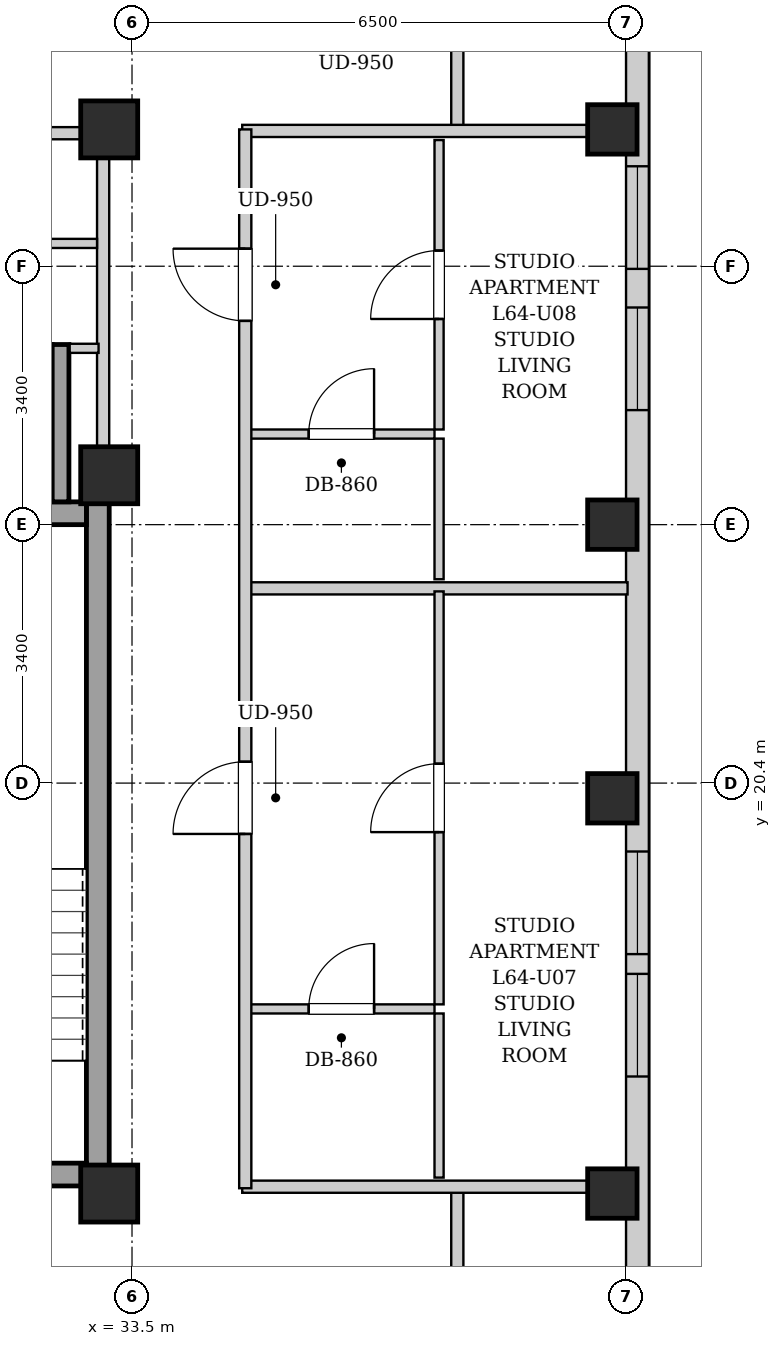
"""IFC4 building model, lengths in metres.
Left out: names, types, materials, properties, quantities, classifications, styles, units other than length and angle.
Written with IfcOpenShell. Run it as: python <this file> out.ifc"""

import sys

from ifc_helpers import new_model, si_unit, direction, frame, frame_2d, origin, origin_2d, place, context, subcontext, project, spatial, rectangle, extrude, element, fill, save


model = new_model("IFC4")
c1 = context("Model", 3, precision=1e-05, world=origin(), true_north=direction((0.0, 1.0)))
c2 = subcontext(c1, "Body", "Model", "MODEL_VIEW")
j1 = project(units=[si_unit("LENGTHUNIT", "METRE"), si_unit("PLANEANGLEUNIT", "RADIAN")], contexts=[c1])
p1 = place(None, origin())
s1 = spatial("IfcSite", under=j1, at=p1, CompositionType="ELEMENT")
p2 = place(p1, origin())
s2 = spatial("IfcBuilding", under=s1, at=p2, CompositionType="ELEMENT")
p3 = place(p2, frame((0.0, 0.0, 220.7)))
s3 = spatial("IfcBuildingStorey", under=s2, at=p3, CompositionType="ELEMENT", Elevation=220.7)
for number, where, z_axis, x_axis in (
    (1, (39.82, 15.0, 0.0), (0.0, 0.0, 1.0), (1.0, 0.0, 0.0)),
    (2, (39.82, 20.2, 0.0), (0.0, 0.0, 1.0), (1.0, 0.0, 0.0)),
    (3, (39.82, 23.8, 0.0), (0.0, 0.0, 1.0), (1.0, 0.0, 0.0)),
    (4, (39.82, 29.0, 0.0), (0.0, 0.0, 1.0), (1.0, 0.0, 0.0)),
):
    element("IfcColumn", number, at=place(p3, frame(where, z_axis=z_axis, x_axis=x_axis)), inside=s3, PredefinedType="COLUMN", context=c2, shape_type="SweptSolid", body=[
        extrude(rectangle(XDim=0.65, YDim=0.65, at=origin_2d()), origin(), (0.0, 0.0, 1.0), 3.4),
    ])
for number, where, z_axis, x_axis in (
    (5, (33.2, 15.0, 0.0), (0.0, 0.0, 1.0), (1.0, 0.0, 0.0)),
    (6, (33.2, 29.0, 0.0), (0.0, 0.0, 1.0), (1.0, 0.0, 0.0)),
    (7, (33.2, 24.45, 0.0), (0.0, 0.0, 1.0), (1.0, 0.0, 0.0)),
):
    element("IfcColumn", number, at=place(p3, frame(where, z_axis=z_axis, x_axis=x_axis)), inside=s3, PredefinedType="COLUMN", context=c2, shape_type="SweptSolid", body=[
        extrude(rectangle(XDim=0.75, YDim=0.75, at=origin_2d()), origin(), (0.0, 0.0, 1.0), 3.4),
    ])
p4 = place(p3, frame((40.15, 37.7, 0.0), z_axis=(0.0, 0.0, 1.0), x_axis=(0.0, -1.0, 0.0)))
e8 = element("IfcWall", 8, at=p4, inside=s3, PredefinedType="SOLIDWALL", context=c2, shape_type="SweptSolid", body=[
    extrude(rectangle(XDim=31.4, YDim=0.3, at=frame_2d((15.7, 0.0))), origin(), (0.0, 0.0, 1.0), 3.14),
])
p5 = place(p4, frame((28.546, 0.0, 0.55)))
e9 = element("IfcOpeningElement", 9, at=p5, cuts=e8, PredefinedType="OPENING", context=c2, shape_type="SweptSolid", body=[
    extrude(rectangle(XDim=1.35, YDim=1.2, at=frame_2d((0.675, 0.6))), frame((0.0, 0.16, 0.0), z_axis=(0.0, -1.0, 0.0), x_axis=(1.0, 0.0, 0.0)), (0.0, 0.0, 1.0), 0.32),
])
p6 = place(p4, frame((1.504, 0.0, 0.55)))
e10 = element("IfcOpeningElement", 10, at=p6, cuts=e8, PredefinedType="OPENING", context=c2, shape_type="SweptSolid", body=[
    extrude(rectangle(XDim=1.35, YDim=1.2, at=frame_2d((0.675, 0.6))), frame((0.0, 0.16, 0.0), z_axis=(0.0, -1.0, 0.0), x_axis=(1.0, 0.0, 0.0)), (0.0, 0.0, 1.0), 0.32),
])
p7 = place(p4, frame((18.2, 0.0, 0.55)))
e11 = element("IfcOpeningElement", 11, at=p7, cuts=e8, PredefinedType="OPENING", context=c2, shape_type="SweptSolid", body=[
    extrude(rectangle(XDim=1.35, YDim=1.2, at=frame_2d((0.675, 0.6))), frame((0.0, 0.16, 0.0), z_axis=(0.0, -1.0, 0.0), x_axis=(1.0, 0.0, 0.0)), (0.0, 0.0, 1.0), 0.32),
])
p8 = place(p4, frame((19.81, 0.0, 0.55)))
e12 = element("IfcOpeningElement", 12, at=p8, cuts=e8, PredefinedType="OPENING", context=c2, shape_type="SweptSolid", body=[
    extrude(rectangle(XDim=1.35, YDim=1.2, at=frame_2d((0.675, 0.6))), frame((0.0, 0.16, 0.0), z_axis=(0.0, -1.0, 0.0), x_axis=(1.0, 0.0, 0.0)), (0.0, 0.0, 1.0), 0.32),
])
p9 = place(p4, frame((11.043, 0.0, 0.55)))
e13 = element("IfcOpeningElement", 13, at=p9, cuts=e8, PredefinedType="OPENING", context=c2, shape_type="SweptSolid", body=[
    extrude(rectangle(XDim=1.35, YDim=1.2, at=frame_2d((0.675, 0.6))), frame((0.0, 0.16, 0.0), z_axis=(0.0, -1.0, 0.0), x_axis=(1.0, 0.0, 0.0)), (0.0, 0.0, 1.0), 0.32),
])
p10 = place(p4, frame((9.185, 0.0, 0.55)))
e14 = element("IfcOpeningElement", 14, at=p10, cuts=e8, PredefinedType="OPENING", context=c2, shape_type="SweptSolid", body=[
    extrude(rectangle(XDim=1.35, YDim=1.2, at=frame_2d((0.675, 0.6))), frame((0.0, 0.16, 0.0), z_axis=(0.0, -1.0, 0.0), x_axis=(1.0, 0.0, 0.0)), (0.0, 0.0, 1.0), 0.32),
])
p11 = place(p3, frame((33.05, 15.1, 0.0), z_axis=(0.0, 0.0, 1.0), x_axis=(0.0, 1.0, 0.0)))
e15 = element("IfcWall", 15, at=p11, inside=s3, PredefinedType="SHEAR", context=c2, shape_type="SweptSolid", body=[
    extrude(rectangle(XDim=9.0, YDim=0.3, at=frame_2d((4.5, 0.0))), origin(), (0.0, 0.0, 1.0), 3.14),
])
p12 = place(p3, frame((30.05, 23.95, 0.0), z_axis=(0.0, 0.0, 1.0), x_axis=(1.0, 0.0, 0.0)))
e16 = element("IfcWall", 16, at=p12, inside=s3, PredefinedType="SHEAR", context=c2, shape_type="SweptSolid", body=[
    extrude(rectangle(XDim=2.85, YDim=0.3, at=frame_2d((1.425, 0.0))), origin(), (0.0, 0.0, 1.0), 3.14),
])
p13 = place(p3, frame((30.05, 15.25, 0.0), z_axis=(0.0, 0.0, 1.0), x_axis=(1.0, 0.0, 0.0)))
e17 = element("IfcWall", 17, at=p13, inside=s3, PredefinedType="SHEAR", context=c2, shape_type="SweptSolid", body=[
    extrude(rectangle(XDim=2.85, YDim=0.3, at=frame_2d((1.425, 0.0))), origin(), (0.0, 0.0, 1.0), 3.14),
])
p14 = place(p13, frame((0.86, 0.0, 0.0)))
e18 = element("IfcOpeningElement", 18, at=p14, cuts=e17, PredefinedType="OPENING", context=c2, shape_type="SweptSolid", body=[
    extrude(rectangle(XDim=1.1, YDim=2.05, at=frame_2d((0.55, 1.025))), frame((0.0, 0.16, 0.0), z_axis=(0.0, -1.0, 0.0), x_axis=(1.0, 0.0, 0.0)), (0.0, 0.0, 1.0), 0.32),
])
p15 = place(p3, frame((32.56, 24.1, 0.0), z_axis=(0.0, 0.0, 1.0), x_axis=(0.0, 1.0, 0.0)))
e19 = element("IfcWall", 19, at=p15, inside=s3, PredefinedType="SHEAR", context=c2, shape_type="SweptSolid", body=[
    extrude(rectangle(XDim=2.07, YDim=0.22, at=frame_2d((1.035, 0.0))), origin(), (0.0, 0.0, 1.0), 3.14),
])
p16 = place(p3, frame((33.12, 24.12, 0.0), z_axis=(0.0, 0.0, 1.0), x_axis=(0.0, 1.0, 0.0)))
e20 = element("IfcWall", 20, at=p16, inside=s3, PredefinedType="PARTITIONING", context=c2, shape_type="SweptSolid", body=[
    extrude(rectangle(XDim=4.76, YDim=0.16, at=frame_2d((2.38, 0.0))), origin(), (0.0, 0.0, 1.0), 3.14),
])
p17 = place(p3, frame((32.68, 26.12, 0.0), z_axis=(0.0, 0.0, 1.0), x_axis=(1.0, 0.0, 0.0)))
e21 = element("IfcWall", 21, at=p17, inside=s3, PredefinedType="PARTITIONING", context=c2, shape_type="SweptSolid", body=[
    extrude(rectangle(XDim=0.38, YDim=0.12, at=frame_2d((0.19, 0.0))), origin(), (0.0, 0.0, 1.0), 3.14),
])
p18 = place(p3, frame((30.12, 27.5, 0.0), z_axis=(0.0, 0.0, 1.0), x_axis=(1.0, 0.0, 0.0)))
e22 = element("IfcWall", 22, at=p18, inside=s3, PredefinedType="PARTITIONING", context=c2, shape_type="SweptSolid", body=[
    extrude(rectangle(XDim=2.92, YDim=0.12, at=frame_2d((1.46, 0.0))), origin(), (0.0, 0.0, 1.0), 3.14),
])
p19 = place(p18, frame((0.97, 0.0, 0.0)))
e23 = element("IfcOpeningElement", 23, at=p19, cuts=e22, PredefinedType="OPENING", context=c2, shape_type="SweptSolid", body=[
    extrude(rectangle(XDim=0.86, YDim=2.05, at=frame_2d((0.43, 1.025))), frame((0.0, 0.07, 0.0), z_axis=(0.0, -1.0, 0.0), x_axis=(1.0, 0.0, 0.0)), (0.0, 0.0, 1.0), 0.14),
])
p20 = place(p3, frame((25.72, 28.95, 0.0), z_axis=(0.0, 0.0, 1.0), x_axis=(1.0, 0.0, 0.0)))
e24 = element("IfcWall", 24, at=p20, inside=s3, PredefinedType="PARTITIONING", context=c2, shape_type="SweptSolid", body=[
    extrude(rectangle(XDim=7.32, YDim=0.16, at=frame_2d((3.66, 0.0))), origin(), (0.0, 0.0, 1.0), 2.668),
])
p21 = place(p20, frame((1.27, 0.0, 0.0)))
e25 = element("IfcOpeningElement", 25, at=p21, cuts=e24, PredefinedType="OPENING", context=c2, shape_type="SweptSolid", body=[
    extrude(rectangle(XDim=0.86, YDim=2.05, at=frame_2d((0.43, 1.025))), frame((0.0, 0.09, 0.0), z_axis=(0.0, -1.0, 0.0), x_axis=(1.0, 0.0, 0.0)), (0.0, 0.0, 1.0), 0.18),
])
for number, where, z_axis, x_axis in (
    (26, (37.78, 13.51, 0.0), (0.0, 0.0, 1.0), (0.0, 1.0, 0.0)),
    (27, (37.78, 28.98, 0.0), (0.0, 0.0, 1.0), (0.0, 1.0, 0.0)),
):
    element("IfcWall", number, at=place(p3, frame(where, z_axis=z_axis, x_axis=x_axis)), inside=s3, PredefinedType="PARTITIONING", context=c2, shape_type="SweptSolid", body=[
        extrude(rectangle(XDim=1.58, YDim=0.16, at=frame_2d((0.79, 0.0))), origin(), (0.0, 0.0, 1.0), 3.14),
    ])
for number, where, z_axis, x_axis in (
    (28, (34.95, 15.09, 0.0), (0.0, 0.0, 1.0), (1.0, 0.0, 0.0)),
    (29, (34.95, 28.98, 0.0), (0.0, 0.0, 1.0), (1.0, 0.0, 0.0)),
):
    element("IfcWall", number, at=place(p3, frame(where, z_axis=z_axis, x_axis=x_axis)), inside=s3, PredefinedType="PARTITIONING", context=c2, shape_type="SweptSolid", body=[
        extrude(rectangle(XDim=5.07, YDim=0.16, at=frame_2d((2.535, 0.0))), origin(), (0.0, 0.0, 1.0), 2.668),
    ])
p22 = place(p3, frame((35.03, 22.962, 0.0), z_axis=(0.0, 0.0, 1.0), x_axis=(1.0, 0.0, 0.0)))
e30 = element("IfcWall", 30, at=p22, inside=s3, PredefinedType="PARTITIONING", context=c2, shape_type="SweptSolid", body=[
    extrude(rectangle(XDim=4.99, YDim=0.16, at=frame_2d((2.495, 0.0))), origin(), (0.0, 0.0, 1.0), 3.14),
])
p23 = place(p3, frame((35.03, 17.429, 0.0), z_axis=(0.0, 0.0, 1.0), x_axis=(1.0, 0.0, 0.0)))
e31 = element("IfcWall", 31, at=p23, inside=s3, PredefinedType="PARTITIONING", context=c2, shape_type="SweptSolid", body=[
    extrude(rectangle(XDim=2.45, YDim=0.12, at=frame_2d((1.225, 0.0))), origin(), (0.0, 0.0, 1.0), 3.14),
])
p24 = place(p23, frame((0.795, 0.0, 0.0)))
e32 = element("IfcOpeningElement", 32, at=p24, cuts=e31, PredefinedType="OPENING", context=c2, shape_type="SweptSolid", body=[
    extrude(rectangle(XDim=0.86, YDim=2.05, at=frame_2d((0.43, 1.025))), frame((0.0, 0.07, 0.0), z_axis=(0.0, -1.0, 0.0), x_axis=(1.0, 0.0, 0.0)), (0.0, 0.0, 1.0), 0.14),
])
p25 = place(p3, frame((37.54, 15.21, 0.0), z_axis=(0.0, 0.0, 1.0), x_axis=(0.0, 1.0, 0.0)))
e33 = element("IfcWall", 33, at=p25, inside=s3, PredefinedType="PARTITIONING", context=c2, shape_type="SweptSolid", body=[
    extrude(rectangle(XDim=2.159, YDim=0.12, at=frame_2d((1.08, 0.0))), origin(), (0.0, 0.0, 1.0), 3.14),
])
p26 = place(p3, frame((37.54, 17.489, 0.0), z_axis=(0.0, 0.0, 1.0), x_axis=(0.0, 1.0, 0.0)))
e34 = element("IfcWall", 34, at=p26, inside=s3, PredefinedType="PARTITIONING", context=c2, shape_type="SweptSolid", body=[
    extrude(rectangle(XDim=5.433, YDim=0.12, at=frame_2d((2.717, 0.0))), origin(), (0.0, 0.0, 1.0), 3.14),
])
p27 = place(p26, frame((2.266, 0.0, 0.0)))
e35 = element("IfcOpeningElement", 35, at=p27, cuts=e34, PredefinedType="OPENING", context=c2, shape_type="SweptSolid", body=[
    extrude(rectangle(XDim=0.9, YDim=2.05, at=frame_2d((0.45, 1.025))), frame((0.0, 0.07, 0.0), z_axis=(0.0, -1.0, 0.0), x_axis=(1.0, 0.0, 0.0)), (0.0, 0.0, 1.0), 0.14),
])
p28 = place(p3, frame((35.03, 24.992, 0.0), z_axis=(0.0, 0.0, 1.0), x_axis=(1.0, 0.0, 0.0)))
e36 = element("IfcWall", 36, at=p28, inside=s3, PredefinedType="PARTITIONING", context=c2, shape_type="SweptSolid", body=[
    extrude(rectangle(XDim=2.45, YDim=0.12, at=frame_2d((1.225, 0.0))), origin(), (0.0, 0.0, 1.0), 3.14),
])
p29 = place(p28, frame((0.795, 0.0, 0.0)))
e37 = element("IfcOpeningElement", 37, at=p29, cuts=e36, PredefinedType="OPENING", context=c2, shape_type="SweptSolid", body=[
    extrude(rectangle(XDim=0.86, YDim=2.05, at=frame_2d((0.43, 1.025))), frame((0.0, 0.07, 0.0), z_axis=(0.0, -1.0, 0.0), x_axis=(1.0, 0.0, 0.0)), (0.0, 0.0, 1.0), 0.14),
])
p30 = place(p3, frame((37.54, 23.082, 0.0), z_axis=(0.0, 0.0, 1.0), x_axis=(0.0, 1.0, 0.0)))
e38 = element("IfcWall", 38, at=p30, inside=s3, PredefinedType="PARTITIONING", context=c2, shape_type="SweptSolid", body=[
    extrude(rectangle(XDim=1.85, YDim=0.12, at=frame_2d((0.925, 0.0))), origin(), (0.0, 0.0, 1.0), 3.14),
])
p31 = place(p3, frame((37.54, 25.052, 0.0), z_axis=(0.0, 0.0, 1.0), x_axis=(0.0, 1.0, 0.0)))
e39 = element("IfcWall", 39, at=p31, inside=s3, PredefinedType="PARTITIONING", context=c2, shape_type="SweptSolid", body=[
    extrude(rectangle(XDim=3.808, YDim=0.12, at=frame_2d((1.904, 0.0))), origin(), (0.0, 0.0, 1.0), 3.14),
])
p32 = place(p31, frame((1.454, 0.0, 0.0)))
e40 = element("IfcOpeningElement", 40, at=p32, cuts=e39, PredefinedType="OPENING", context=c2, shape_type="SweptSolid", body=[
    extrude(rectangle(XDim=0.9, YDim=2.05, at=frame_2d((0.45, 1.025))), frame((0.0, 0.07, 0.0), z_axis=(0.0, -1.0, 0.0), x_axis=(1.0, 0.0, 0.0)), (0.0, 0.0, 1.0), 0.14),
])
p33 = place(p3, frame((34.99, 15.07, 0.0), z_axis=(0.0, 0.0, 1.0), x_axis=(0.0, 1.0, 0.0)))
e41 = element("IfcWall", 41, at=p33, inside=s3, PredefinedType="PARTITIONING", context=c2, shape_type="SweptSolid", body=[
    extrude(rectangle(XDim=13.93, YDim=0.16, at=frame_2d((6.965, 0.0))), origin(), (0.0, 0.0, 1.0), 3.14),
])
p34 = place(p33, frame((4.661, 0.0, 0.0)))
e42 = element("IfcOpeningElement", 42, at=p34, cuts=e41, PredefinedType="OPENING", context=c2, shape_type="SweptSolid", body=[
    extrude(rectangle(XDim=0.95, YDim=2.1, at=frame_2d((0.475, 1.05))), frame((0.0, 0.09, 0.0), z_axis=(0.0, -1.0, 0.0), x_axis=(1.0, 0.0, 0.0)), (0.0, 0.0, 1.0), 0.18),
])
p35 = place(p33, frame((11.411, 0.0, 0.0)))
e43 = element("IfcOpeningElement", 43, at=p35, cuts=e41, PredefinedType="OPENING", context=c2, shape_type="SweptSolid", body=[
    extrude(rectangle(XDim=0.95, YDim=2.1, at=frame_2d((0.475, 1.05))), frame((0.0, 0.09, 0.0), z_axis=(0.0, -1.0, 0.0), x_axis=(1.0, 0.0, 0.0)), (0.0, 0.0, 1.0), 0.18),
])
p36 = place(p24, origin())
e44 = element("IfcDoor", 44, at=p36, inside=s3, OperationType="SINGLE_SWING_RIGHT", PredefinedType="DOOR", context=c2, shape_type="SweptSolid", body=[
    extrude(rectangle(XDim=0.86, YDim=2.05, at=frame_2d((0.43, 1.025))), frame((0.0, 0.025, 0.0), z_axis=(0.0, -1.0, 0.0), x_axis=(1.0, 0.0, 0.0)), (0.0, 0.0, 1.0), 0.05),
])
fill(e32, e44)
p37 = place(p27, origin())
e45 = element("IfcDoor", 45, at=p37, inside=s3, OperationType="SINGLE_SWING_LEFT", PredefinedType="DOOR", context=c2, shape_type="SweptSolid", body=[
    extrude(rectangle(XDim=0.9, YDim=2.05, at=frame_2d((0.45, 1.025))), frame((0.0, 0.025, 0.0), z_axis=(0.0, -1.0, 0.0), x_axis=(1.0, 0.0, 0.0)), (0.0, 0.0, 1.0), 0.05),
])
fill(e35, e45)
p38 = place(p29, origin())
e46 = element("IfcDoor", 46, at=p38, inside=s3, OperationType="SINGLE_SWING_RIGHT", PredefinedType="DOOR", context=c2, shape_type="SweptSolid", body=[
    extrude(rectangle(XDim=0.86, YDim=2.05, at=frame_2d((0.43, 1.025))), frame((0.0, 0.025, 0.0), z_axis=(0.0, -1.0, 0.0), x_axis=(1.0, 0.0, 0.0)), (0.0, 0.0, 1.0), 0.05),
])
fill(e37, e46)
p39 = place(p32, origin())
e47 = element("IfcDoor", 47, at=p39, inside=s3, OperationType="SINGLE_SWING_LEFT", PredefinedType="DOOR", context=c2, shape_type="SweptSolid", body=[
    extrude(rectangle(XDim=0.9, YDim=2.05, at=frame_2d((0.45, 1.025))), frame((0.0, 0.025, 0.0), z_axis=(0.0, -1.0, 0.0), x_axis=(1.0, 0.0, 0.0)), (0.0, 0.0, 1.0), 0.05),
])
fill(e40, e47)
p40 = place(p34, origin())
e48 = element("IfcDoor", 48, at=p40, inside=s3, OperationType="SINGLE_SWING_LEFT", PredefinedType="DOOR", context=c2, shape_type="SweptSolid", body=[
    extrude(rectangle(XDim=0.95, YDim=2.1, at=frame_2d((0.475, 1.05))), frame((0.0, 0.025, 0.0), z_axis=(0.0, -1.0, 0.0), x_axis=(1.0, 0.0, 0.0)), (0.0, 0.0, 1.0), 0.05),
])
fill(e42, e48)
p41 = place(p35, origin())
e49 = element("IfcDoor", 49, at=p41, inside=s3, OperationType="SINGLE_SWING_RIGHT", PredefinedType="DOOR", context=c2, shape_type="SweptSolid", body=[
    extrude(rectangle(XDim=0.95, YDim=2.1, at=frame_2d((0.475, 1.05))), frame((0.0, 0.025, 0.0), z_axis=(0.0, -1.0, 0.0), x_axis=(1.0, 0.0, 0.0)), (0.0, 0.0, 1.0), 0.05),
])
fill(e43, e49)
p42 = place(p7, origin())
e50 = element("IfcWindow", 50, at=p42, inside=s3, PartitioningType="SINGLE_PANEL", PredefinedType="WINDOW", context=c2, shape_type="SweptSolid", body=[
    extrude(rectangle(XDim=1.35, YDim=1.2, at=frame_2d((0.675, 0.6))), frame((0.0, 0.03, 0.0), z_axis=(0.0, -1.0, 0.0), x_axis=(1.0, 0.0, 0.0)), (0.0, 0.0, 1.0), 0.06),
])
fill(e11, e50)
p43 = place(p8, origin())
e51 = element("IfcWindow", 51, at=p43, inside=s3, PartitioningType="SINGLE_PANEL", PredefinedType="WINDOW", context=c2, shape_type="SweptSolid", body=[
    extrude(rectangle(XDim=1.35, YDim=1.2, at=frame_2d((0.675, 0.6))), frame((0.0, 0.03, 0.0), z_axis=(0.0, -1.0, 0.0), x_axis=(1.0, 0.0, 0.0)), (0.0, 0.0, 1.0), 0.06),
])
fill(e12, e51)
p44 = place(p9, origin())
e52 = element("IfcWindow", 52, at=p44, inside=s3, PartitioningType="SINGLE_PANEL", PredefinedType="WINDOW", context=c2, shape_type="SweptSolid", body=[
    extrude(rectangle(XDim=1.35, YDim=1.2, at=frame_2d((0.675, 0.6))), frame((0.0, 0.03, 0.0), z_axis=(0.0, -1.0, 0.0), x_axis=(1.0, 0.0, 0.0)), (0.0, 0.0, 1.0), 0.06),
])
fill(e13, e52)
p45 = place(p10, origin())
e53 = element("IfcWindow", 53, at=p45, inside=s3, PartitioningType="SINGLE_PANEL", PredefinedType="WINDOW", context=c2, shape_type="SweptSolid", body=[
    extrude(rectangle(XDim=1.35, YDim=1.2, at=frame_2d((0.675, 0.6))), frame((0.0, 0.03, 0.0), z_axis=(0.0, -1.0, 0.0), x_axis=(1.0, 0.0, 0.0)), (0.0, 0.0, 1.0), 0.06),
])
fill(e14, e53)
save(model, sys.argv[1])
